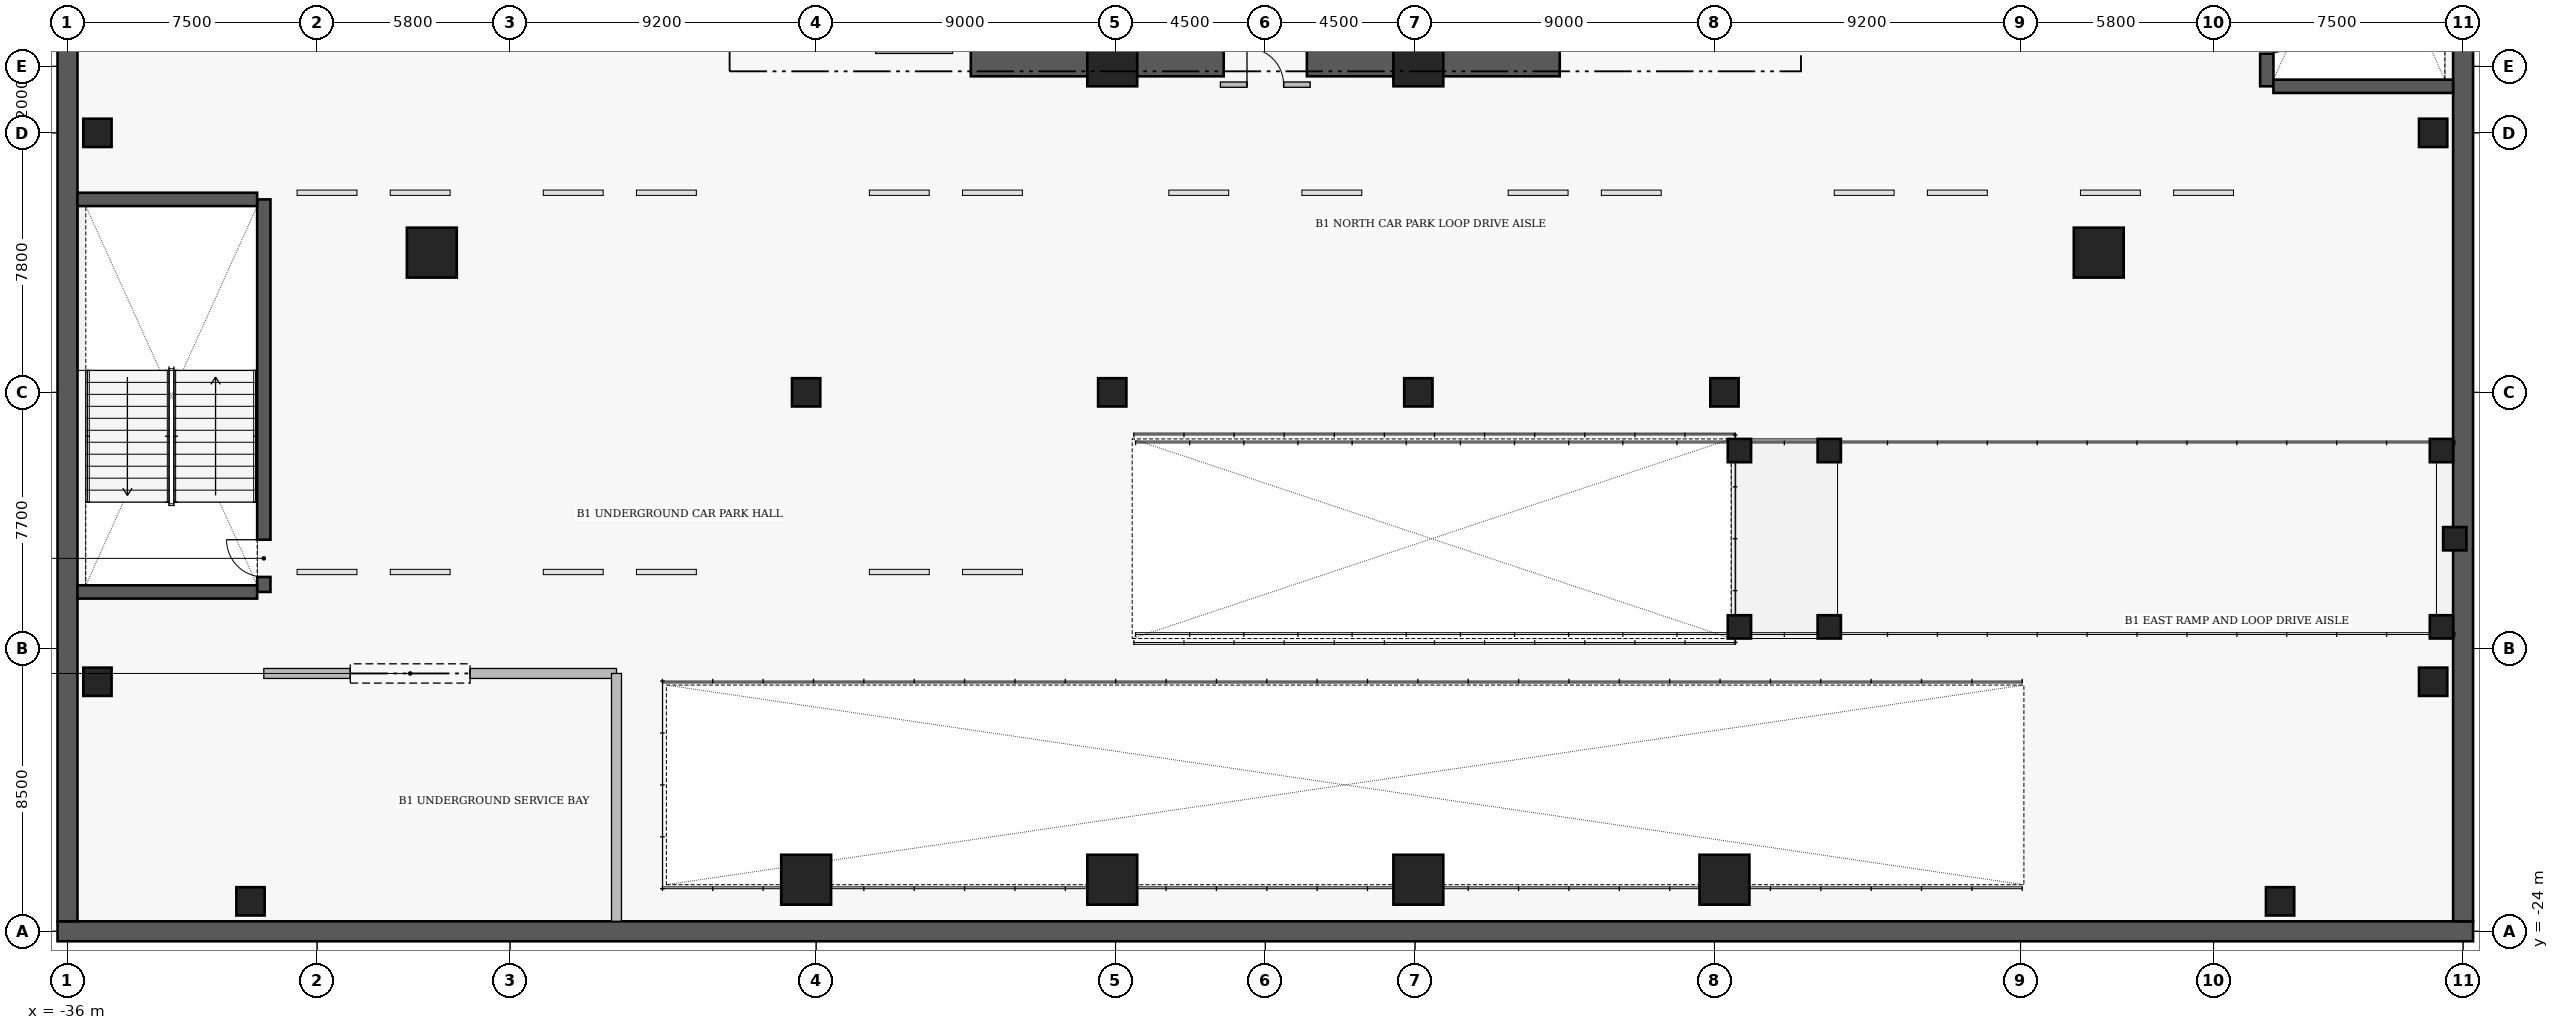
"""IFC4 building model, lengths in metres.
Left out: names, types, materials, properties, quantities, classifications, styles, units other than length and angle.
Written with IfcOpenShell. Run it as: python <this file> out.ifc"""

import sys

from ifc_helpers import new_model, si_unit, direction, frame, frame_2d, origin, origin_2d, place, context, subcontext, project, spatial, rectangle, extrude, element, fill, save


model = new_model("IFC4")
c1 = context("Model", 3, precision=1e-05, world=origin(), true_north=direction((0.0, 1.0)))
c2 = subcontext(c1, "Body", "Model", "MODEL_VIEW")
j1 = project(units=[si_unit("LENGTHUNIT", "METRE"), si_unit("PLANEANGLEUNIT", "RADIAN")], contexts=[c1])
p1 = place(None, origin())
s1 = spatial("IfcSite", under=j1, at=p1, CompositionType="ELEMENT")
p2 = place(p1, origin())
s2 = spatial("IfcBuilding", under=s1, at=p2, CompositionType="ELEMENT")
p3 = place(p2, frame((0.0, 0.0, -4.5)))
s3 = spatial("IfcBuildingStorey", under=s2, at=p3, CompositionType="ELEMENT", Elevation=-4.5)
p4 = place(p3, frame((36.3, -24.0, 0.0), z_axis=(0.0, 0.0, 1.0), x_axis=(-1.0, 0.0, 0.0)))
e1 = element("IfcWall", 1, at=p4, inside=s3, PredefinedType="USERDEFINED", context=c2, shape_type="SweptSolid", body=[
    extrude(rectangle(XDim=72.6, YDim=0.6, at=frame_2d((36.3, 0.0))), origin(), (0.0, 0.0, 1.0), 4.24),
])
for number, where, z_axis, x_axis in (
    (2, (-36.0, -23.7, 0.0), (0.0, 0.0, 1.0), (0.0, 1.0, 0.0)),
    (3, (36.0, 24.7, 0.0), (0.0, 0.0, 1.0), (0.0, -1.0, 0.0)),
):
    element("IfcWall", number, at=place(p3, frame(where, z_axis=z_axis, x_axis=x_axis)), inside=s3, PredefinedType="USERDEFINED", context=c2, shape_type="SweptSolid", body=[
        extrude(rectangle(XDim=48.4, YDim=0.6, at=frame_2d((24.2, 0.0))), origin(), (0.0, 0.0, 1.0), 4.24),
    ])
for number, where, z_axis, x_axis in (
    (4, (-8.85, 2.15, 0.0), (0.0, 0.0, 1.0), (1.0, 0.0, 0.0)),
    (5, (1.25, 2.15, 0.0), (0.0, 0.0, 1.0), (1.0, 0.0, 0.0)),
):
    element("IfcWall", number, at=place(p3, frame(where, z_axis=z_axis, x_axis=x_axis)), inside=s3, PredefinedType="SHEAR", context=c2, shape_type="SweptSolid", body=[
        extrude(rectangle(XDim=7.6, YDim=0.9, at=frame_2d((3.8, 0.0))), origin(), (0.0, 0.0, 1.0), 4.24),
    ])
p5 = place(p3, frame((-30.1, -13.8, 0.0), z_axis=(0.0, 0.0, 1.0), x_axis=(0.0, 1.0, 0.0)))
e6 = element("IfcWall", 6, at=p5, inside=s3, PredefinedType="SHEAR", context=c2, shape_type="SweptSolid", body=[
    extrude(rectangle(XDim=11.8, YDim=0.4, at=frame_2d((5.9, 0.0))), origin(), (0.0, 0.0, 1.0), 4.31),
])
p6 = place(p5, frame((0.45, 0.0, 0.0)))
e7 = element("IfcOpeningElement", 7, at=p6, cuts=e6, PredefinedType="OPENING", context=c2, shape_type="SweptSolid", body=[
    extrude(rectangle(XDim=1.12, YDim=2.22, at=frame_2d((0.56, 1.11))), frame((0.0, 0.21, 0.0), z_axis=(0.0, -1.0, 0.0), x_axis=(1.0, 0.0, 0.0)), (0.0, 0.0, 1.0), 0.42),
])
for number, where, z_axis, x_axis in (
    (8, (-35.7, -13.8, 0.0), (0.0, 0.0, 1.0), (1.0, 0.0, 0.0)),
    (9, (-35.7, -2.0, 0.0), (0.0, 0.0, 1.0), (1.0, 0.0, 0.0)),
):
    element("IfcWall", number, at=place(p3, frame(where, z_axis=z_axis, x_axis=x_axis)), inside=s3, PredefinedType="SHEAR", context=c2, shape_type="SweptSolid", body=[
        extrude(rectangle(XDim=5.4, YDim=0.4, at=frame_2d((2.7, 0.0))), origin(), (0.0, 0.0, 1.0), 4.31),
    ])
p7 = place(p3, frame((30.1, 13.2, 0.0), z_axis=(0.0, 0.0, 1.0), x_axis=(0.0, -1.0, 0.0)))
e10 = element("IfcWall", 10, at=p7, inside=s3, PredefinedType="SHEAR", context=c2, shape_type="SweptSolid", body=[
    extrude(rectangle(XDim=11.8, YDim=0.4, at=frame_2d((5.9, 0.0))), origin(), (0.0, 0.0, 1.0), 4.31),
])
p8 = place(p7, frame((9.7, 0.0, 0.0)))
e11 = element("IfcOpeningElement", 11, at=p8, cuts=e10, PredefinedType="OPENING", context=c2, shape_type="SweptSolid", body=[
    extrude(rectangle(XDim=1.12, YDim=2.22, at=frame_2d((0.56, 1.11))), frame((0.0, 0.21, 0.0), z_axis=(0.0, -1.0, 0.0), x_axis=(1.0, 0.0, 0.0)), (0.0, 0.0, 1.0), 0.42),
])
p9 = place(p3, frame((30.3, 1.4, 0.0), z_axis=(0.0, 0.0, 1.0), x_axis=(1.0, 0.0, 0.0)))
e12 = element("IfcWall", 12, at=p9, inside=s3, PredefinedType="SHEAR", context=c2, shape_type="SweptSolid", body=[
    extrude(rectangle(XDim=5.4, YDim=0.4, at=frame_2d((2.7, 0.0))), origin(), (0.0, 0.0, 1.0), 4.31),
])
for number, where, z_axis, x_axis in (
    (13, (-4.6, 2.15, 0.0), (0.0, 0.0, 1.0), (1.0, 0.0, 0.0)),
    (14, (4.6, 2.15, 0.0), (0.0, 0.0, 1.0), (1.0, 0.0, 0.0)),
    (15, (-13.8, -22.45, 0.0), (0.0, 0.0, 1.0), (1.0, 0.0, 0.0)),
    (16, (-4.6, -22.45, 0.0), (0.0, 0.0, 1.0), (1.0, 0.0, 0.0)),
    (17, (4.6, -22.45, 0.0), (0.0, 0.0, 1.0), (1.0, 0.0, 0.0)),
    (18, (13.8, -22.45, 0.0), (0.0, 0.0, 1.0), (1.0, 0.0, 0.0)),
    (19, (-25.05, -3.6, 0.0), (0.0, 0.0, 1.0), (1.0, 0.0, 0.0)),
    (20, (25.05, -3.6, 0.0), (0.0, 0.0, 1.0), (1.0, 0.0, 0.0)),
):
    element("IfcColumn", number, at=place(p3, frame(where, z_axis=z_axis, x_axis=x_axis)), inside=s3, PredefinedType="COLUMN", context=c2, shape_type="SweptSolid", body=[
        extrude(rectangle(XDim=1.5, YDim=1.5, at=origin_2d()), origin(), (0.0, 0.0, 1.0), 4.5),
    ])
for number, where, z_axis, x_axis in (
    (21, (-30.5, -23.1, 0.0), (0.0, 0.0, 1.0), (1.0, 0.0, 0.0)),
    (22, (30.5, -23.1, 0.0), (0.0, 0.0, 1.0), (1.0, 0.0, 0.0)),
    (23, (-35.1, -16.5, 0.0), (0.0, 0.0, 1.0), (1.0, 0.0, 0.0)),
    (24, (-35.1, 0.0, 0.0), (0.0, 0.0, 1.0), (1.0, 0.0, 0.0)),
    (25, (35.1, -16.5, 0.0), (0.0, 0.0, 1.0), (1.0, 0.0, 0.0)),
    (26, (35.1, 0.0, 0.0), (0.0, 0.0, 1.0), (1.0, 0.0, 0.0)),
    (27, (-13.8, -7.8, 0.0), (0.0, 0.0, 1.0), (1.0, 0.0, 0.0)),
    (28, (-4.6, -7.8, 0.0), (0.0, 0.0, 1.0), (1.0, 0.0, 0.0)),
    (29, (4.6, -7.8, 0.0), (0.0, 0.0, 1.0), (1.0, 0.0, 0.0)),
    (30, (13.8, -7.8, 0.0), (0.0, 0.0, 1.0), (1.0, 0.0, 0.0)),
):
    element("IfcColumn", number, at=place(p3, frame(where, z_axis=z_axis, x_axis=x_axis)), inside=s3, PredefinedType="COLUMN", context=c2, shape_type="SweptSolid", body=[
        extrude(rectangle(XDim=0.85, YDim=0.85, at=origin_2d()), origin(), (0.0, 0.0, 1.0), 4.5),
    ])
for number, where, z_axis, x_axis in (
    (31, (14.25, -14.85, 0.0), (0.0, 0.0, 1.0), (1.0, 0.0, 0.0)),
    (32, (16.95, -14.85, 0.0), (0.0, 0.0, 1.0), (1.0, 0.0, 0.0)),
    (33, (14.25, -9.55, 0.0), (0.0, 0.0, 1.0), (1.0, 0.0, 0.0)),
    (34, (16.95, -9.55, 0.0), (0.0, 0.0, 1.0), (1.0, 0.0, 0.0)),
):
    element("IfcColumn", number, at=place(p3, frame(where, z_axis=z_axis, x_axis=x_axis)), inside=s3, PredefinedType="COLUMN", context=c2, shape_type="SweptSolid", body=[
        extrude(rectangle(XDim=0.7, YDim=0.7, at=origin_2d()), origin(), (0.0, 0.0, 1.0), 1.97),
    ])
for number, where, z_axis, x_axis in (
    (35, (35.35, -14.85, 0.0), (0.0, 0.0, 1.0), (1.0, 0.0, 0.0)),
    (36, (35.35, -9.55, 0.0), (0.0, 0.0, 1.0), (1.0, 0.0, 0.0)),
    (37, (35.75, -12.2, 0.0), (0.0, 0.0, 1.0), (1.0, 0.0, 0.0)),
):
    element("IfcColumn", number, at=place(p3, frame(where, z_axis=z_axis, x_axis=x_axis)), inside=s3, PredefinedType="COLUMN", context=c2, shape_type="SweptSolid", body=[
        extrude(rectangle(XDim=0.7, YDim=0.7, at=origin_2d()), origin(), (0.0, 0.0, 1.0), 4.22),
    ])
p10 = place(p3, frame((-30.1, -16.25, 0.0), z_axis=(0.0, 0.0, 1.0), x_axis=(1.0, 0.0, 0.0)))
e38 = element("IfcWall", 38, at=p10, inside=s3, PredefinedType="STANDARD", context=c2, shape_type="SweptSolid", body=[
    extrude(rectangle(XDim=10.6, YDim=0.3, at=frame_2d((5.3, 0.0))), origin(), (0.0, 0.0, 1.0), 4.24),
])
p11 = place(p10, frame((2.6, 0.0, 0.0)))
e39 = element("IfcOpeningElement", 39, at=p11, cuts=e38, PredefinedType="OPENING", context=c2, shape_type="SweptSolid", body=[
    extrude(rectangle(XDim=3.6, YDim=3.4, at=frame_2d((1.8, 1.7))), frame((0.0, 0.16, 0.0), z_axis=(0.0, -1.0, 0.0), x_axis=(1.0, 0.0, 0.0)), (0.0, 0.0, 1.0), 0.32),
])
p12 = place(p3, frame((-19.5, -23.7, 0.0), z_axis=(0.0, 0.0, 1.0), x_axis=(0.0, 1.0, 0.0)))
e40 = element("IfcWall", 40, at=p12, inside=s3, PredefinedType="STANDARD", context=c2, shape_type="SweptSolid", body=[
    extrude(rectangle(XDim=7.45, YDim=0.3, at=frame_2d((3.725, 0.0))), origin(), (0.0, 0.0, 1.0), 4.24),
])
p13 = place(p3, frame((-1.35, 1.45, 0.0), z_axis=(0.0, 0.0, 1.0), x_axis=(1.0, 0.0, 0.0)))
e41 = element("IfcWall", 41, at=p13, inside=s3, PredefinedType="PARTITIONING", context=c2, shape_type="SweptSolid", body=[
    extrude(rectangle(XDim=2.7, YDim=0.16, at=frame_2d((1.35, 0.0))), origin(), (0.0, 0.0, 1.0), 4.24),
])
p14 = place(p13, frame((0.8, 0.0, 0.0)))
e42 = element("IfcOpeningElement", 42, at=p14, cuts=e41, PredefinedType="OPENING", context=c2, shape_type="SweptSolid", body=[
    extrude(rectangle(XDim=1.1, YDim=2.2, at=frame_2d((0.55, 1.1))), frame((0.0, 0.09, 0.0), z_axis=(0.0, -1.0, 0.0), x_axis=(1.0, 0.0, 0.0)), (0.0, 0.0, 1.0), 0.18),
])
p15 = place(p3, frame((-11.71, 2.47, 0.0), z_axis=(0.0, 0.0, 1.0), x_axis=(1.0, 0.0, 0.0)))
e43 = element("IfcWall", 43, at=p15, inside=s3, PredefinedType="PARTITIONING", context=c2, shape_type="SweptSolid", body=[
    extrude(rectangle(XDim=2.31, YDim=0.165, at=frame_2d((1.155, 0.0))), origin(), (0.0, 0.0, 1.0), 2.84),
])
p16 = place(p11, origin())
e44 = element("IfcDoor", 44, at=p16, inside=s3, OperationType="ROLLINGUP", PredefinedType="GATE", context=c2, shape_type="SweptSolid", body=[
    extrude(rectangle(XDim=3.6, YDim=3.4, at=frame_2d((1.8, 1.7))), frame((0.0, 0.025, 0.0), z_axis=(0.0, -1.0, 0.0), x_axis=(1.0, 0.0, 0.0)), (0.0, 0.0, 1.0), 0.05),
])
fill(e39, e44)
p17 = place(p6, origin())
e45 = element("IfcDoor", 45, at=p17, inside=s3, OperationType="SINGLE_SWING_RIGHT", PredefinedType="DOOR", context=c2, shape_type="SweptSolid", body=[
    extrude(rectangle(XDim=1.12, YDim=2.22, at=frame_2d((0.56, 1.11))), frame((0.0, 0.025, 0.0), z_axis=(0.0, -1.0, 0.0), x_axis=(1.0, 0.0, 0.0)), (0.0, 0.0, 1.0), 0.05),
])
fill(e7, e45)
p18 = place(p8, origin())
e46 = element("IfcDoor", 46, at=p18, inside=s3, OperationType="SINGLE_SWING_LEFT", PredefinedType="DOOR", context=c2, shape_type="SweptSolid", body=[
    extrude(rectangle(XDim=1.12, YDim=2.22, at=frame_2d((0.56, 1.11))), frame((0.0, 0.025, 0.0), z_axis=(0.0, -1.0, 0.0), x_axis=(1.0, 0.0, 0.0)), (0.0, 0.0, 1.0), 0.05),
])
fill(e11, e46)
p19 = place(p14, origin())
e47 = element("IfcDoor", 47, at=p19, inside=s3, OperationType="SINGLE_SWING_LEFT", PredefinedType="DOOR", context=c2, shape_type="SweptSolid", body=[
    extrude(rectangle(XDim=1.1, YDim=2.2, at=frame_2d((0.55, 1.1))), frame((0.0, 0.025, 0.0), z_axis=(0.0, -1.0, 0.0), x_axis=(1.0, 0.0, 0.0)), (0.0, 0.0, 1.0), 0.05),
])
fill(e42, e47)
save(model, sys.argv[1])
